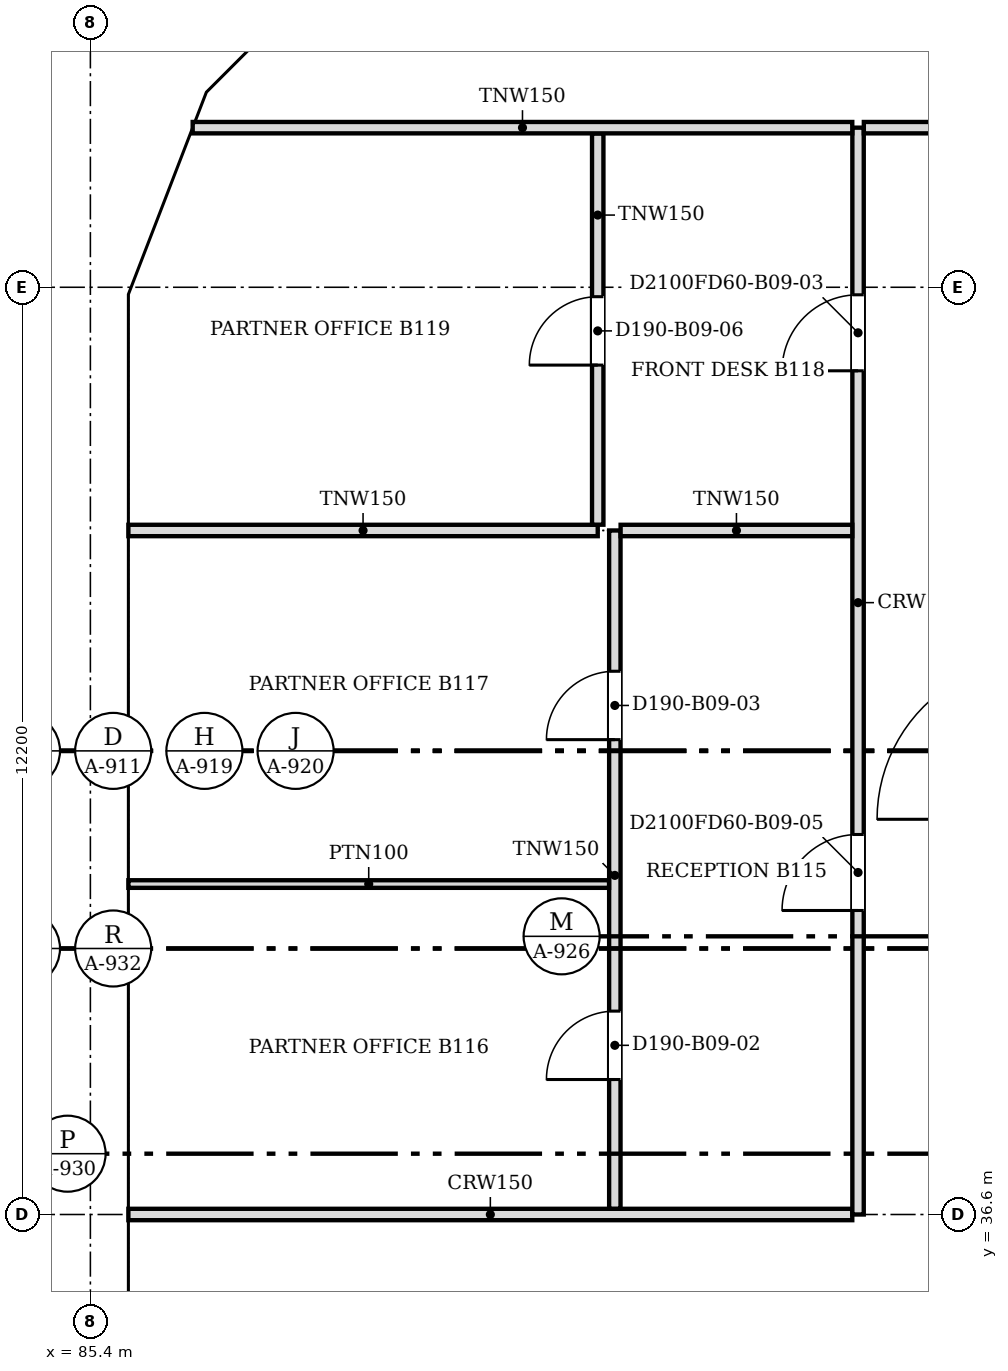
"""IFC4 building model, lengths in metres.
Left out: names, types, materials, properties, quantities, classifications, styles, units other than length and angle.
Written with IfcOpenShell. Run it as: python <this file> out.ifc"""

import sys

from ifc_helpers import new_model, si_unit, direction, frame, frame_2d, origin, place, context, subcontext, project, spatial, polyline, rectangle, outline, extrude, faceted_brep, source, transform, mapped, element, fill, save


model = new_model("IFC4")
c1 = context("Model", 3, precision=1e-05, world=origin(), true_north=direction((0.0, 1.0)))
c2 = subcontext(c1, "Body", "Model", "MODEL_VIEW")
j1 = project(units=[si_unit("LENGTHUNIT", "METRE"), si_unit("PLANEANGLEUNIT", "RADIAN")], contexts=[c1])
p1 = place(None, origin())
s1 = spatial("IfcSite", under=j1, at=p1, CompositionType="ELEMENT")
p2 = place(p1, origin())
s2 = spatial("IfcBuilding", under=s1, at=p2, CompositionType="ELEMENT")
p3 = place(p2, frame((0.0, 0.0, 87.6)))
s3 = spatial("IfcBuildingStorey", under=s2, at=p3, CompositionType="ELEMENT", Elevation=87.6)
m1 = source(origin(), c2, "Body", "Brep", [
    faceted_brep([(0.053, -0.25, 0.0), (2.997, -0.25, 3.8), (0.053, -0.25, 7.6), (0.0, -0.25, 7.532), (0.0, -0.25, 0.068), (0.106, 0.25, 7.531), (2.944, 0.25, 3.868), (2.944, 0.25, 3.732), (0.106, 0.25, 0.068), (2.997, 0.0, 3.8), (0.053, 0.0, 0.0), (0.053, 0.0, 7.6)], [[[0, 1, 2, 3, 4]], [[5, 6, 7, 8]], [[8, 7, 9, 1, 0, 10]], [[6, 5, 11, 2, 1, 9]], [[3, 2, 11]], [[10, 0, 4]], [[8, 10, 4, 3, 11, 5]], [[7, 6, 9]]]),
])
p4 = place(p3, frame((88.831, 53.625, -3.8), z_axis=(0.0, 0.0, 1.0), x_axis=(-0.707147509625, -0.707066050402, 0.0)))
e1 = element("IfcWall", 1, at=p4, inside=s3, PredefinedType="SOLIDWALL", context=c2, shape_type="MappedRepresentation", body=[
    mapped(m1, transform((0.0, 0.0, 0.0), scale=1.0)),
])
m2 = source(origin(), c2, "Body", "SweptSolid", [
    extrude(outline(polyline([(0.253, 0.666), (2.681, 3.8), (0.253, 6.934), (0.253, 0.666)])), frame((0.0, 0.26, 0.0), z_axis=(0.0, -1.0, 0.0), x_axis=(1.0, 0.0, 0.0)), (0.0, 0.0, 1.0), 0.52),
])
p5 = place(p4, origin())
e2 = element("IfcOpeningElement", 2, at=p5, cuts=e1, PredefinedType="OPENING", context=c2, shape_type="MappedRepresentation", body=[
    mapped(m2, transform((0.0, 0.0, 0.0), scale=1.0)),
])
m3 = source(origin(), c2, "Body", "Brep", [
    faceted_brep([(2.95, -0.25, 0.0), (2.997, -0.25, 0.059), (2.997, -0.25, 7.541), (2.95, -0.25, 7.6), (0.0, -0.25, 3.8), (0.053, 0.25, 3.868), (2.904, 0.25, 7.54), (2.904, 0.25, 0.06), (0.053, 0.25, 3.732), (2.95, 0.0, 0.0), (2.95, 0.0, 7.6), (0.0, 0.0, 3.8)], [[[0, 1, 2, 3, 4]], [[5, 6, 7, 8]], [[1, 0, 9]], [[10, 3, 2]], [[6, 5, 11, 4, 3, 10]], [[8, 7, 9, 0, 4, 11]], [[8, 11, 5]], [[1, 9, 7, 6, 10, 2]]]),
])
p6 = place(p3, frame((86.712, 51.506, -3.8), z_axis=(0.0, 0.0, 1.0), x_axis=(-0.359874094142, -0.933000876937, 0.0)))
e3 = element("IfcWall", 3, at=p6, inside=s3, PredefinedType="SOLIDWALL", context=c2, shape_type="MappedRepresentation", body=[
    mapped(m3, transform((0.0, 0.0, 0.0), scale=1.0)),
])
m4 = source(origin(), c2, "Body", "SweptSolid", [
    extrude(outline(polyline([(2.75, 6.935), (0.316, 3.8), (2.75, 0.665), (2.75, 6.935)])), frame((0.0, 0.26, 0.0), z_axis=(0.0, -1.0, 0.0), x_axis=(1.0, 0.0, 0.0)), (0.0, 0.0, 1.0), 0.52),
])
p7 = place(p6, origin())
e4 = element("IfcOpeningElement", 4, at=p7, cuts=e3, PredefinedType="OPENING", context=c2, shape_type="MappedRepresentation", body=[
    mapped(m4, transform((0.0, 0.0, 0.0), scale=1.0)),
])
m5 = source(origin(), c2, "Body", "Brep", [
    faceted_brep([(0.047, -0.25, 0.0), (3.05, -0.25, 3.8), (0.047, -0.25, 7.6), (0.0, -0.25, 7.54), (0.0, -0.25, 0.06), (0.093, 0.25, 7.541), (3.05, 0.25, 3.8), (0.093, 0.25, 0.059), (0.047, 0.0, 0.0), (0.047, 0.0, 7.6)], [[[0, 1, 2, 3, 4]], [[5, 6, 7]], [[7, 6, 1, 0, 8]], [[6, 5, 9, 2, 1]], [[3, 2, 9]], [[8, 0, 4]], [[7, 8, 4, 3, 9, 5]]]),
])
p8 = place(p3, frame((85.65, 48.8, -3.8), z_axis=(0.0, 0.0, 1.0), x_axis=(0.0, -1.0, 0.0)))
e5 = element("IfcWall", 5, at=p8, inside=s3, PredefinedType="SOLIDWALL", context=c2, shape_type="MappedRepresentation", body=[
    mapped(m5, transform((0.0, 0.0, 0.0), scale=1.0)),
])
m6 = source(origin(), c2, "Body", "SweptSolid", [
    extrude(outline(polyline([(0.247, 0.656), (2.731, 3.8), (0.247, 6.944), (0.247, 0.656)])), frame((0.0, 0.26, 0.0), z_axis=(0.0, -1.0, 0.0), x_axis=(1.0, 0.0, 0.0)), (0.0, 0.0, 1.0), 0.52),
])
p9 = place(p8, origin())
e6 = element("IfcOpeningElement", 6, at=p9, cuts=e5, PredefinedType="OPENING", context=c2, shape_type="MappedRepresentation", body=[
    mapped(m6, transform((0.0, 0.0, 0.0), scale=1.0)),
])
m7 = source(origin(), c2, "Body", "SweptSolid", [
    extrude(outline(polyline([(3.05, 0.0), (6.1, 3.8), (3.05, 7.6), (0.0, 3.8), (3.05, 0.0)])), frame((0.0, 0.25, 0.0), z_axis=(0.0, -1.0, 0.0), x_axis=(1.0, 0.0, 0.0)), (0.0, 0.0, 1.0), 0.5),
])
p10 = place(p3, frame((85.65, 45.75, -3.8), z_axis=(0.0, 0.0, 1.0), x_axis=(0.0, -1.0, 0.0)))
e7 = element("IfcWall", 7, at=p10, inside=s3, PredefinedType="SOLIDWALL", context=c2, shape_type="MappedRepresentation", body=[
    mapped(m7, transform((0.0, 0.0, 0.0), scale=1.0)),
])
m8 = source(origin(), c2, "Body", "SweptSolid", [
    extrude(outline(polyline([(3.05, 0.399), (5.78, 3.8), (3.05, 7.2), (0.321, 3.8), (3.05, 0.399)])), frame((0.0, 0.26, 0.0), z_axis=(0.0, -1.0, 0.0), x_axis=(1.0, 0.0, 0.0)), (0.0, 0.0, 1.0), 0.52),
])
p11 = place(p10, origin())
e8 = element("IfcOpeningElement", 8, at=p11, cuts=e7, PredefinedType="OPENING", context=c2, shape_type="MappedRepresentation", body=[
    mapped(m8, transform((0.0, 0.0, 0.0), scale=1.0)),
])
m9 = source(origin(), c2, "Body", "Brep", [
    faceted_brep([(3.05, -0.25, 0.0), (6.1, -0.25, 3.8), (6.1, -0.25, 3.8), (3.05, -0.25, 7.6), (0.0, -0.25, 3.8), (0.0, 0.25, 3.8), (3.05, 0.25, 7.6), (6.1, 0.25, 3.8), (6.1, 0.25, 3.8), (3.05, 0.25, 0.0)], [[[0, 1, 2, 3, 4]], [[5, 6, 7, 8, 9]], [[9, 8, 1, 0]], [[7, 6, 3, 2]], [[6, 5, 4, 3]], [[5, 9, 0, 4]], [[1, 8, 7, 2]]]),
])
p12 = place(p3, frame((85.65, 39.65, -3.8), z_axis=(0.0, 0.0, 1.0), x_axis=(0.0, -1.0, 0.0)))
e9 = element("IfcWall", 9, at=p12, inside=s3, PredefinedType="SOLIDWALL", context=c2, shape_type="MappedRepresentation", body=[
    mapped(m9, transform((0.0, 0.0, 0.0), scale=1.0)),
])
p13 = place(p12, origin())
e10 = element("IfcOpeningElement", 10, at=p13, cuts=e9, PredefinedType="OPENING", context=c2, shape_type="MappedRepresentation", body=[
    mapped(m8, transform((0.0, 0.0, 0.0), scale=1.0)),
])
p14 = place(p2, frame((0.0, 0.0, 91.4)))
s4 = spatial("IfcBuildingStorey", under=s2, at=p14, CompositionType="ELEMENT", Elevation=91.4)
m10 = source(origin(), c2, "Body", "Brep", [
    faceted_brep([(2.944, -0.25, 0.0), (2.997, -0.25, 0.068), (2.997, -0.25, 7.532), (2.944, -0.25, 7.6), (0.0, -0.25, 3.8), (0.053, 0.25, 3.868), (2.891, 0.25, 7.532), (2.891, 0.25, 0.068), (0.053, 0.25, 3.731), (2.944, 0.0, 0.0), (2.944, 0.0, 7.6), (0.0, 0.0, 3.8)], [[[0, 1, 2, 3, 4]], [[5, 6, 7, 8]], [[1, 0, 9]], [[10, 3, 2]], [[6, 5, 11, 4, 3, 10]], [[8, 7, 9, 0, 4, 11]], [[8, 11, 5]], [[1, 9, 7, 6, 10, 2]]]),
])
p15 = place(p14, frame((88.794, 53.588, -3.8), z_axis=(0.0, 0.0, 1.0), x_axis=(-0.707066050402, -0.707147509625, 0.0)))
e11 = element("IfcWall", 11, at=p15, inside=s4, PredefinedType="SOLIDWALL", context=c2, shape_type="MappedRepresentation", body=[
    mapped(m10, transform((0.0, 0.0, 0.0), scale=1.0)),
])
m11 = source(origin(), c2, "Body", "SweptSolid", [
    extrude(outline(polyline([(2.744, 6.934), (0.316, 3.8), (2.744, 0.666), (2.744, 6.934)])), frame((0.0, 0.26, 0.0), z_axis=(0.0, -1.0, 0.0), x_axis=(1.0, 0.0, 0.0)), (0.0, 0.0, 1.0), 0.52),
])
p16 = place(p15, origin())
e12 = element("IfcOpeningElement", 12, at=p16, cuts=e11, PredefinedType="OPENING", context=c2, shape_type="MappedRepresentation", body=[
    mapped(m11, transform((0.0, 0.0, 0.0), scale=1.0)),
])
m12 = source(origin(), c2, "Body", "Brep", [
    faceted_brep([(0.053, -0.25, 0.0), (3.003, -0.25, 3.8), (0.053, -0.25, 7.6), (0.0, -0.25, 7.531), (0.0, -0.25, 0.068), (0.106, 0.25, 7.532), (2.957, 0.25, 3.86), (2.957, 0.25, 3.74), (0.106, 0.25, 0.068), (3.003, 0.0, 3.8), (0.053, 0.0, 0.0), (0.053, 0.0, 7.6)], [[[0, 1, 2, 3, 4]], [[5, 6, 7, 8]], [[8, 7, 9, 1, 0, 10]], [[6, 5, 11, 2, 1, 9]], [[3, 2, 11]], [[10, 0, 4]], [[8, 10, 4, 3, 11, 5]], [[9, 7, 6]]]),
])
p17 = place(p14, frame((86.731, 51.556, -3.8), z_axis=(0.0, 0.0, 1.0), x_axis=(-0.359855894603, -0.933007896601, 0.0)))
e13 = element("IfcWall", 13, at=p17, inside=s4, PredefinedType="SOLIDWALL", context=c2, shape_type="MappedRepresentation", body=[
    mapped(m12, transform((0.0, 0.0, 0.0), scale=1.0)),
])
m13 = source(origin(), c2, "Body", "SweptSolid", [
    extrude(outline(polyline([(0.253, 0.665), (2.687, 3.8), (0.253, 6.935), (0.253, 0.665)])), frame((0.0, 0.26, 0.0), z_axis=(0.0, -1.0, 0.0), x_axis=(1.0, 0.0, 0.0)), (0.0, 0.0, 1.0), 0.52),
])
p18 = place(p17, origin())
e14 = element("IfcOpeningElement", 14, at=p18, cuts=e13, PredefinedType="OPENING", context=c2, shape_type="MappedRepresentation", body=[
    mapped(m13, transform((0.0, 0.0, 0.0), scale=1.0)),
])
m14 = source(origin(), c2, "Body", "Brep", [
    faceted_brep([(3.003, -0.25, 0.0), (6.053, -0.25, 3.8), (3.003, -0.25, 7.6), (0.0, -0.25, 3.8), (0.047, 0.25, 3.859), (3.003, 0.25, 7.6), (6.053, 0.25, 3.8), (3.003, 0.25, 0.0), (0.047, 0.25, 3.741), (0.0, 0.0, 3.8)], [[[0, 1, 2, 3]], [[4, 5, 6, 7, 8]], [[7, 6, 1, 0]], [[6, 5, 2, 1]], [[5, 4, 9, 3, 2]], [[8, 7, 0, 3, 9]], [[8, 9, 4]]]),
])
p19 = place(p14, frame((85.65, 48.753, -3.8), z_axis=(0.0, 0.0, 1.0), x_axis=(0.0, -1.0, 0.0)))
e15 = element("IfcWall", 15, at=p19, inside=s4, PredefinedType="SOLIDWALL", context=c2, shape_type="MappedRepresentation", body=[
    mapped(m14, transform((0.0, 0.0, 0.0), scale=1.0)),
])
m15 = source(origin(), c2, "Body", "SweptSolid", [
    extrude(outline(polyline([(3.005, 0.401), (5.733, 3.8), (3.005, 7.199), (0.319, 3.8), (3.005, 0.401)])), frame((0.0, 0.26, 0.0), z_axis=(0.0, -1.0, 0.0), x_axis=(1.0, 0.0, 0.0)), (0.0, 0.0, 1.0), 0.52),
])
p20 = place(p19, origin())
e16 = element("IfcOpeningElement", 16, at=p20, cuts=e15, PredefinedType="OPENING", context=c2, shape_type="MappedRepresentation", body=[
    mapped(m15, transform((0.0, 0.0, 0.0), scale=1.0)),
])
m16 = source(origin(), c2, "Body", "Brep", [
    faceted_brep([(3.05, -0.25, 0.0), (6.1, -0.25, 3.8), (6.1, -0.25, 3.8), (3.05, -0.25, 7.6), (0.0, -0.25, 3.8), (0.0, 0.25, 3.8), (3.05, 0.25, 7.6), (6.1, 0.25, 3.8), (6.1, 0.25, 3.8), (3.05, 0.25, 0.0)], [[[0, 1, 2, 3, 4]], [[5, 6, 7, 8, 9]], [[9, 8, 1, 0]], [[7, 6, 3, 2]], [[6, 5, 4, 3]], [[5, 9, 0, 4]], [[1, 8, 7, 2]]]),
])
p21 = place(p14, frame((85.65, 42.7, -3.8), z_axis=(0.0, 0.0, 1.0), x_axis=(0.0, -1.0, 0.0)))
e17 = element("IfcWall", 17, at=p21, inside=s4, PredefinedType="SOLIDWALL", context=c2, shape_type="MappedRepresentation", body=[
    mapped(m16, transform((0.0, 0.0, 0.0), scale=1.0)),
])
m17 = source(origin(), c2, "Body", "SweptSolid", [
    extrude(outline(polyline([(3.05, 0.399), (5.78, 3.8), (3.05, 7.2), (0.321, 3.8), (3.05, 0.399)])), frame((0.0, 0.26, 0.0), z_axis=(0.0, -1.0, 0.0), x_axis=(1.0, 0.0, 0.0)), (0.0, 0.0, 1.0), 0.52),
])
p22 = place(p21, origin())
e18 = element("IfcOpeningElement", 18, at=p22, cuts=e17, PredefinedType="OPENING", context=c2, shape_type="MappedRepresentation", body=[
    mapped(m17, transform((0.0, 0.0, 0.0), scale=1.0)),
])
m18 = source(origin(), c2, "Body", "SweptSolid", [
    extrude(outline(polyline([(3.05, 0.0), (6.1, 3.8), (3.05, 7.6), (0.0, 3.8), (3.05, 0.0)])), frame((0.0, 0.25, 0.0), z_axis=(0.0, -1.0, 0.0), x_axis=(1.0, 0.0, 0.0)), (0.0, 0.0, 1.0), 0.5),
])
p23 = place(p14, frame((85.65, 36.6, -3.8), z_axis=(0.0, 0.0, 1.0), x_axis=(0.0, -1.0, 0.0)))
e19 = element("IfcWall", 19, at=p23, inside=s4, PredefinedType="SOLIDWALL", context=c2, shape_type="MappedRepresentation", body=[
    mapped(m18, transform((0.0, 0.0, 0.0), scale=1.0)),
])
p24 = place(p23, origin())
e20 = element("IfcOpeningElement", 20, at=p24, cuts=e19, PredefinedType="OPENING", context=c2, shape_type="MappedRepresentation", body=[
    mapped(m17, transform((0.0, 0.0, 0.0), scale=1.0)),
])
p25 = place(p3, frame((85.9, 36.6, 0.0), z_axis=(0.0, 0.0, 1.0), x_axis=(1.0, 0.0, 0.0)))
e21 = element("IfcWall", 21, at=p25, inside=s3, PredefinedType="PARTITIONING", context=c2, shape_type="SweptSolid", body=[
    extrude(rectangle(XDim=9.524, YDim=0.15, at=frame_2d((4.762, 0.0))), origin(), (0.0, 0.0, 1.0), 3.067),
])
p26 = place(p3, frame((95.5, 36.6, 0.0), z_axis=(0.0, 0.0, 1.0), x_axis=(0.0, 1.0, 0.0)))
e22 = element("IfcWall", 22, at=p26, inside=s3, PredefinedType="PARTITIONING", context=c2, shape_type="SweptSolid", body=[
    extrude(rectangle(XDim=14.3, YDim=0.15, at=frame_2d((7.15, 0.0))), origin(), (0.0, 0.0, 1.0), 3.067),
])
m19 = source(origin(), c2, "Body", "SweptSolid", [
    extrude(rectangle(XDim=1.0, YDim=2.1, at=frame_2d((0.5, 1.05))), frame((0.0, 0.085, 0.0), z_axis=(0.0, -1.0, 0.0), x_axis=(1.0, 0.0, 0.0)), (0.0, 0.0, 1.0), 0.17),
])
p27 = place(p26, frame((11.101, 0.0, 0.0)))
e23 = element("IfcOpeningElement", 23, at=p27, cuts=e22, PredefinedType="OPENING", context=c2, shape_type="MappedRepresentation", body=[
    mapped(m19, transform((0.0, 0.0, 0.0), scale=1.0)),
])
p28 = place(p26, frame((4.0, 0.0, 0.0)))
e24 = element("IfcOpeningElement", 24, at=p28, cuts=e22, PredefinedType="OPENING", context=c2, shape_type="MappedRepresentation", body=[
    mapped(m19, transform((0.0, 0.0, 0.0), scale=1.0)),
])
p29 = place(p3, frame((92.3, 36.676, 0.0), z_axis=(0.0, 0.0, 1.0), x_axis=(0.0, 1.0, 0.0)))
e25 = element("IfcWall", 25, at=p29, inside=s3, PredefinedType="PARTITIONING", context=c2, shape_type="SweptSolid", body=[
    extrude(rectangle(XDim=8.924, YDim=0.15, at=frame_2d((4.462, 0.0))), origin(), (0.0, 0.0, 1.0), 3.067),
])
m20 = source(origin(), c2, "Body", "SweptSolid", [
    extrude(rectangle(XDim=0.9, YDim=2.1, at=frame_2d((0.45, 1.05))), frame((0.0, 0.085, 0.0), z_axis=(0.0, -1.0, 0.0), x_axis=(1.0, 0.0, 0.0)), (0.0, 0.0, 1.0), 0.17),
])
p30 = place(p29, frame((1.7, 0.0, 0.0)))
e26 = element("IfcOpeningElement", 26, at=p30, cuts=e25, PredefinedType="OPENING", context=c2, shape_type="MappedRepresentation", body=[
    mapped(m20, transform((0.0, 0.0, 0.0), scale=1.0)),
])
p31 = place(p29, frame((6.172, 0.0, 0.0)))
e27 = element("IfcOpeningElement", 27, at=p31, cuts=e25, PredefinedType="OPENING", context=c2, shape_type="MappedRepresentation", body=[
    mapped(m20, transform((0.0, 0.0, 0.0), scale=1.0)),
])
p32 = place(p3, frame((85.9, 40.948, 0.0), z_axis=(0.0, 0.0, 1.0), x_axis=(1.0, 0.0, 0.0)))
e28 = element("IfcWall", 28, at=p32, inside=s3, PredefinedType="PARTITIONING", context=c2, shape_type="SweptSolid", body=[
    extrude(rectangle(XDim=6.324, YDim=0.1, at=frame_2d((3.162, 0.0))), origin(), (0.0, 0.0, 1.0), 3.067),
])
p33 = place(p3, frame((85.9, 45.6, 0.0), z_axis=(0.0, 0.0, 1.0), x_axis=(1.0, 0.0, 0.0)))
e29 = element("IfcWall", 29, at=p33, inside=s3, PredefinedType="PARTITIONING", context=c2, shape_type="SweptSolid", body=[
    extrude(rectangle(XDim=6.175, YDim=0.15, at=frame_2d((3.087, 0.0))), origin(), (0.0, 0.0, 1.0), 3.067),
])
p34 = place(p3, frame((92.376, 45.6, 0.0), z_axis=(0.0, 0.0, 1.0), x_axis=(1.0, 0.0, 0.0)))
e30 = element("IfcWall", 30, at=p34, inside=s3, PredefinedType="PARTITIONING", context=c2, shape_type="SweptSolid", body=[
    extrude(rectangle(XDim=3.048, YDim=0.15, at=frame_2d((1.524, 0.0))), origin(), (0.0, 0.0, 1.0), 3.067),
])
p35 = place(p3, frame((92.075, 45.676, 0.0), z_axis=(0.0, 0.0, 1.0), x_axis=(0.0, 1.0, 0.0)))
e31 = element("IfcWall", 31, at=p35, inside=s3, PredefinedType="PARTITIONING", context=c2, shape_type="SweptSolid", body=[
    extrude(rectangle(XDim=5.148, YDim=0.15, at=frame_2d((2.574, 0.0))), origin(), (0.0, 0.0, 1.0), 3.067),
])
p36 = place(p35, frame((2.1, 0.0, 0.0)))
e32 = element("IfcOpeningElement", 32, at=p36, cuts=e31, PredefinedType="OPENING", context=c2, shape_type="MappedRepresentation", body=[
    mapped(m20, transform((0.0, 0.0, 0.0), scale=1.0)),
])
p37 = place(p3, frame((86.746, 50.9, 0.0), z_axis=(0.0, 0.0, 1.0), x_axis=(1.0, 0.0, 0.0)))
e33 = element("IfcWall", 33, at=p37, inside=s3, PredefinedType="PARTITIONING", context=c2, shape_type="SweptSolid", body=[
    extrude(rectangle(XDim=8.678, YDim=0.15, at=frame_2d((4.339, 0.0))), origin(), (0.0, 0.0, 1.0), 3.067),
])
p38 = place(p3, frame((95.576, 50.9, 0.0), z_axis=(0.0, 0.0, 1.0), x_axis=(1.0, 0.0, 0.0)))
e34 = element("IfcWall", 34, at=p38, inside=s3, PredefinedType="PARTITIONING", context=c2, shape_type="SweptSolid", body=[
    extrude(rectangle(XDim=4.424, YDim=0.15, at=frame_2d((2.212, 0.0))), origin(), (0.0, 0.0, 1.0), 3.067),
])
p39 = place(p38, frame((1.7, 0.0, 0.0)))
e35 = element("IfcOpeningElement", 35, at=p39, cuts=e34, PredefinedType="OPENING", context=c2, shape_type="MappedRepresentation", body=[
    mapped(m19, transform((0.0, 0.0, 0.0), scale=1.0)),
])
m21 = source(origin(), c2, "Body", "SweptSolid", [
    extrude(rectangle(XDim=0.9, YDim=2.1, at=frame_2d((0.45, 1.05))), frame((0.0, 0.025, 0.0), z_axis=(0.0, -1.0, 0.0), x_axis=(1.0, 0.0, 0.0)), (0.0, 0.0, 1.0), 0.05),
])
p40 = place(p30, origin())
e36 = element("IfcDoor", 36, at=p40, inside=s3, OperationType="SINGLE_SWING_LEFT", PredefinedType="DOOR", context=c2, shape_type="MappedRepresentation", body=[
    mapped(m21, transform((0.0, 0.0, 0.0), scale=1.0)),
])
fill(e26, e36)
p41 = place(p31, origin())
e37 = element("IfcDoor", 37, at=p41, inside=s3, OperationType="SINGLE_SWING_LEFT", PredefinedType="DOOR", context=c2, shape_type="MappedRepresentation", body=[
    mapped(m21, transform((0.0, 0.0, 0.0), scale=1.0)),
])
fill(e27, e37)
p42 = place(p36, origin())
e38 = element("IfcDoor", 38, at=p42, inside=s3, OperationType="SINGLE_SWING_LEFT", PredefinedType="DOOR", context=c2, shape_type="MappedRepresentation", body=[
    mapped(m21, transform((0.0, 0.0, 0.0), scale=1.0)),
])
fill(e32, e38)
m22 = source(origin(), c2, "Body", "SweptSolid", [
    extrude(rectangle(XDim=1.0, YDim=2.1, at=frame_2d((0.5, 1.05))), frame((0.0, 0.025, 0.0), z_axis=(0.0, -1.0, 0.0), x_axis=(1.0, 0.0, 0.0)), (0.0, 0.0, 1.0), 0.05),
])
p43 = place(p27, origin())
e39 = element("IfcDoor", 39, at=p43, inside=s3, OperationType="SINGLE_SWING_LEFT", PredefinedType="DOOR", context=c2, shape_type="MappedRepresentation", body=[
    mapped(m22, transform((0.0, 0.0, 0.0), scale=1.0)),
])
fill(e23, e39)
p44 = place(p28, origin())
e40 = element("IfcDoor", 40, at=p44, inside=s3, OperationType="SINGLE_SWING_LEFT", PredefinedType="DOOR", context=c2, shape_type="MappedRepresentation", body=[
    mapped(m22, transform((0.0, 0.0, 0.0), scale=1.0)),
])
fill(e24, e40)
save(model, sys.argv[1])
